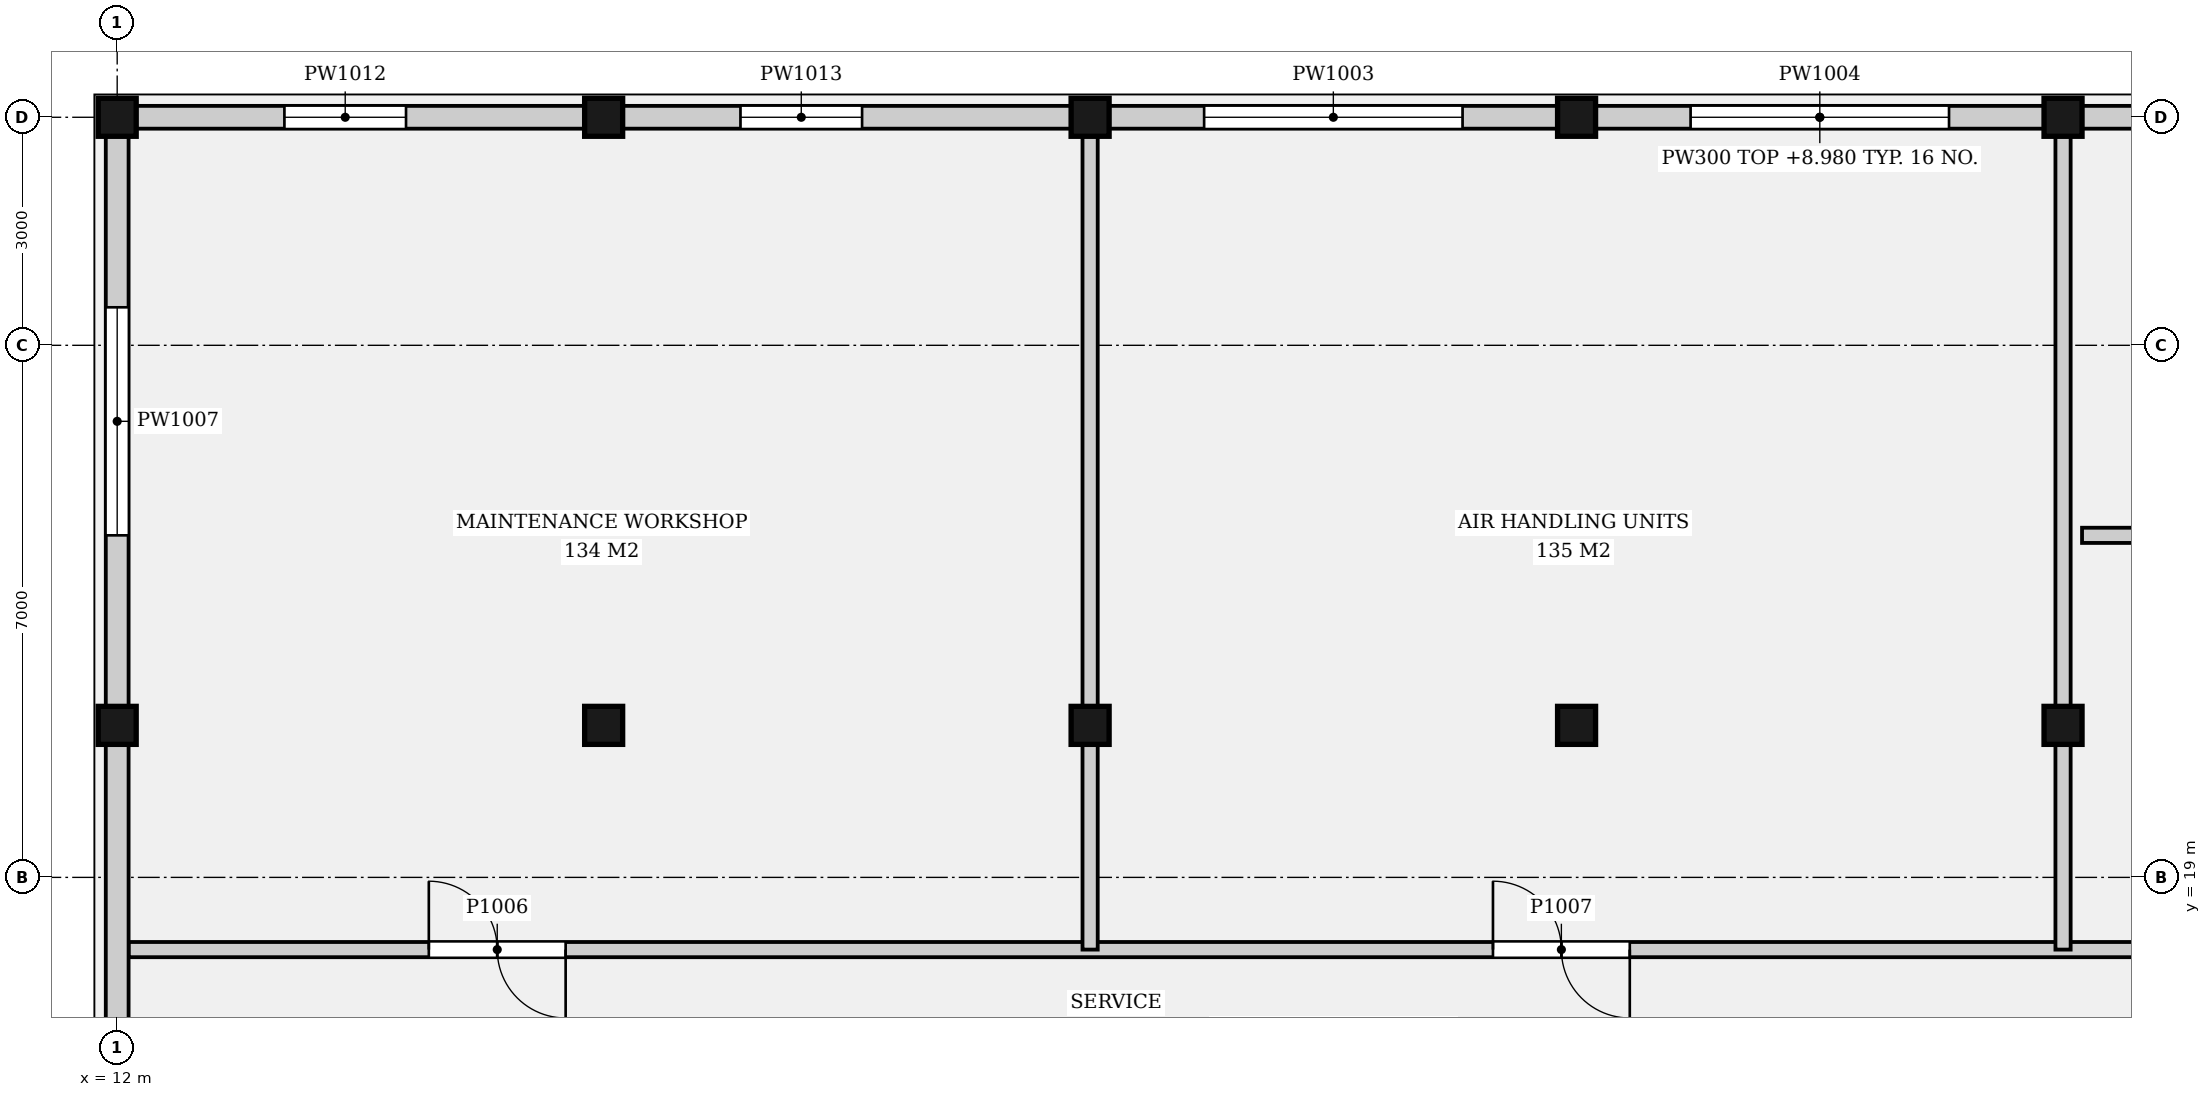
"""IFC4 building model, lengths in metres.
Left out: names, types, materials, properties, quantities, classifications, styles, units other than length and angle.
Written with IfcOpenShell. Run it as: python <this file> out.ifc"""

import sys

from ifc_helpers import new_model, si_unit, direction, frame, frame_2d, origin, origin_2d, place, context, subcontext, project, spatial, rectangle, extrude, element, fill, save


model = new_model("IFC4")
c1 = context("Model", 3, precision=1e-05, world=origin(), true_north=direction((0.0, 1.0)))
c2 = subcontext(c1, "Body", "Model", "MODEL_VIEW")
j1 = project(units=[si_unit("LENGTHUNIT", "METRE"), si_unit("PLANEANGLEUNIT", "RADIAN")], contexts=[c1])
p1 = place(None, origin())
s1 = spatial("IfcSite", under=j1, at=p1, CompositionType="ELEMENT")
p2 = place(p1, origin())
s2 = spatial("IfcBuilding", under=s1, at=p2, CompositionType="ELEMENT")
p3 = place(p2, frame((0.0, 0.0, 5.0)))
s3 = spatial("IfcBuildingStorey", under=s2, at=p3, CompositionType="ELEMENT", Elevation=5.0)
for number, where, z_axis, x_axis in (
    (1, (12.0, 21.0, 0.0), (0.0, 0.0, 1.0), (1.0, 0.0, 0.0)),
    (2, (12.0, 29.0, 0.0), (0.0, 0.0, 1.0), (1.0, 0.0, 0.0)),
    (3, (18.4, 21.0, 0.0), (0.0, 0.0, 1.0), (1.0, 0.0, 0.0)),
    (4, (18.4, 29.0, 0.0), (0.0, 0.0, 1.0), (1.0, 0.0, 0.0)),
    (5, (24.8, 21.0, 0.0), (0.0, 0.0, 1.0), (1.0, 0.0, 0.0)),
    (6, (24.8, 29.0, 0.0), (0.0, 0.0, 1.0), (1.0, 0.0, 0.0)),
    (7, (31.2, 21.0, 0.0), (0.0, 0.0, 1.0), (1.0, 0.0, 0.0)),
    (8, (31.2, 29.0, 0.0), (0.0, 0.0, 1.0), (1.0, 0.0, 0.0)),
    (9, (37.6, 21.0, 0.0), (0.0, 0.0, 1.0), (1.0, 0.0, 0.0)),
    (10, (37.6, 29.0, 0.0), (0.0, 0.0, 1.0), (1.0, 0.0, 0.0)),
):
    element("IfcColumn", number, at=place(p3, frame(where, z_axis=z_axis, x_axis=x_axis)), inside=s3, PredefinedType="COLUMN", context=c2, shape_type="SweptSolid", body=[
        extrude(rectangle(XDim=0.5, YDim=0.5, at=origin_2d()), origin(), (0.0, 0.0, 1.0), 4.4),
    ])
p4 = place(p3, frame((12.25, 29.0, 0.0), z_axis=(0.0, 0.0, 1.0), x_axis=(1.0, 0.0, 0.0)))
e11 = element("IfcWall", 11, at=p4, inside=s3, PredefinedType="SOLIDWALL", context=c2, shape_type="SweptSolid", body=[
    extrude(rectangle(XDim=5.9, YDim=0.3, at=frame_2d((2.95, 0.0))), origin(), (0.0, 0.0, 1.0), 3.98),
])
p5 = place(p4, frame((1.95, 0.0, 1.0)))
e12 = element("IfcOpeningElement", 12, at=p5, cuts=e11, PredefinedType="OPENING", context=c2, shape_type="SweptSolid", body=[
    extrude(rectangle(XDim=1.6, YDim=1.2, at=frame_2d((0.8, 0.6))), frame((0.0, 0.16, 0.0), z_axis=(0.0, -1.0, 0.0), x_axis=(1.0, 0.0, 0.0)), (0.0, 0.0, 1.0), 0.32),
])
p6 = place(p3, frame((18.65, 29.0, 0.0), z_axis=(0.0, 0.0, 1.0), x_axis=(1.0, 0.0, 0.0)))
e13 = element("IfcWall", 13, at=p6, inside=s3, PredefinedType="SOLIDWALL", context=c2, shape_type="SweptSolid", body=[
    extrude(rectangle(XDim=5.9, YDim=0.3, at=frame_2d((2.95, 0.0))), origin(), (0.0, 0.0, 1.0), 3.98),
])
p7 = place(p6, frame((1.55, 0.0, 1.0)))
e14 = element("IfcOpeningElement", 14, at=p7, cuts=e13, PredefinedType="OPENING", context=c2, shape_type="SweptSolid", body=[
    extrude(rectangle(XDim=1.6, YDim=1.2, at=frame_2d((0.8, 0.6))), frame((0.0, 0.16, 0.0), z_axis=(0.0, -1.0, 0.0), x_axis=(1.0, 0.0, 0.0)), (0.0, 0.0, 1.0), 0.32),
])
p8 = place(p3, frame((25.05, 29.0, 0.0), z_axis=(0.0, 0.0, 1.0), x_axis=(1.0, 0.0, 0.0)))
e15 = element("IfcWall", 15, at=p8, inside=s3, PredefinedType="SOLIDWALL", context=c2, shape_type="SweptSolid", body=[
    extrude(rectangle(XDim=5.9, YDim=0.3, at=frame_2d((2.95, 0.0))), origin(), (0.0, 0.0, 1.0), 3.98),
])
p9 = place(p8, frame((1.25, 0.0, 0.6)))
e16 = element("IfcOpeningElement", 16, at=p9, cuts=e15, PredefinedType="OPENING", context=c2, shape_type="SweptSolid", body=[
    extrude(rectangle(XDim=3.4, YDim=2.4, at=frame_2d((1.7, 1.2))), frame((0.0, 0.16, 0.0), z_axis=(0.0, -1.0, 0.0), x_axis=(1.0, 0.0, 0.0)), (0.0, 0.0, 1.0), 0.32),
])
p10 = place(p3, frame((31.45, 29.0, 0.0), z_axis=(0.0, 0.0, 1.0), x_axis=(1.0, 0.0, 0.0)))
e17 = element("IfcWall", 17, at=p10, inside=s3, PredefinedType="SOLIDWALL", context=c2, shape_type="SweptSolid", body=[
    extrude(rectangle(XDim=5.9, YDim=0.3, at=frame_2d((2.95, 0.0))), origin(), (0.0, 0.0, 1.0), 3.98),
])
p11 = place(p10, frame((1.25, 0.0, 0.6)))
e18 = element("IfcOpeningElement", 18, at=p11, cuts=e17, PredefinedType="OPENING", context=c2, shape_type="SweptSolid", body=[
    extrude(rectangle(XDim=3.4, YDim=2.4, at=frame_2d((1.7, 1.2))), frame((0.0, 0.16, 0.0), z_axis=(0.0, -1.0, 0.0), x_axis=(1.0, 0.0, 0.0)), (0.0, 0.0, 1.0), 0.32),
])
p12 = place(p3, frame((37.85, 29.0, 0.0), z_axis=(0.0, 0.0, 1.0), x_axis=(1.0, 0.0, 0.0)))
e19 = element("IfcWall", 19, at=p12, inside=s3, PredefinedType="SOLIDWALL", context=c2, shape_type="SweptSolid", body=[
    extrude(rectangle(XDim=5.9, YDim=0.3, at=frame_2d((2.95, 0.0))), origin(), (0.0, 0.0, 1.0), 3.98),
])
p13 = place(p12, frame((1.25, 0.0, 0.6)))
e20 = element("IfcOpeningElement", 20, at=p13, cuts=e19, PredefinedType="OPENING", context=c2, shape_type="SweptSolid", body=[
    extrude(rectangle(XDim=3.0, YDim=2.2, at=frame_2d((1.5, 1.1))), frame((0.0, 0.16, 0.0), z_axis=(0.0, -1.0, 0.0), x_axis=(1.0, 0.0, 0.0)), (0.0, 0.0, 1.0), 0.32),
])
p14 = place(p3, frame((12.0, 13.25, 0.0), z_axis=(0.0, 0.0, 1.0), x_axis=(0.0, 1.0, 0.0)))
e21 = element("IfcWall", 21, at=p14, inside=s3, PredefinedType="SOLIDWALL", context=c2, shape_type="SweptSolid", body=[
    extrude(rectangle(XDim=7.5, YDim=0.3, at=frame_2d((3.75, 0.0))), origin(), (0.0, 0.0, 1.0), 3.98),
])
p15 = place(p14, frame((0.55, 0.0, 1.2)))
e22 = element("IfcOpeningElement", 22, at=p15, cuts=e21, PredefinedType="OPENING", context=c2, shape_type="SweptSolid", body=[
    extrude(rectangle(XDim=1.4, YDim=1.2, at=frame_2d((0.7, 0.6))), frame((0.0, 0.16, 0.0), z_axis=(0.0, -1.0, 0.0), x_axis=(1.0, 0.0, 0.0)), (0.0, 0.0, 1.0), 0.32),
])
p16 = place(p3, frame((12.0, 21.25, 0.0), z_axis=(0.0, 0.0, 1.0), x_axis=(0.0, 1.0, 0.0)))
e23 = element("IfcWall", 23, at=p16, inside=s3, PredefinedType="SOLIDWALL", context=c2, shape_type="SweptSolid", body=[
    extrude(rectangle(XDim=7.5, YDim=0.3, at=frame_2d((3.75, 0.0))), origin(), (0.0, 0.0, 1.0), 3.98),
])
p17 = place(p16, frame((2.25, 0.0, 0.6)))
e24 = element("IfcOpeningElement", 24, at=p17, cuts=e23, PredefinedType="OPENING", context=c2, shape_type="SweptSolid", body=[
    extrude(rectangle(XDim=3.0, YDim=2.2, at=frame_2d((1.5, 1.1))), frame((0.0, 0.16, 0.0), z_axis=(0.0, -1.0, 0.0), x_axis=(1.0, 0.0, 0.0)), (0.0, 0.0, 1.0), 0.32),
])
p18 = place(p3, frame((12.15, 18.05, 0.0), z_axis=(0.0, 0.0, 1.0), x_axis=(1.0, 0.0, 0.0)))
e25 = element("IfcWall", 25, at=p18, inside=s3, PredefinedType="PARTITIONING", context=c2, shape_type="SweptSolid", body=[
    extrude(rectangle(XDim=31.7, YDim=0.2, at=frame_2d((15.85, 0.0))), origin(), (0.0, 0.0, 1.0), 3.98),
])
p19 = place(p18, frame((3.95, 0.0, 0.0)))
e26 = element("IfcOpeningElement", 26, at=p19, cuts=e25, PredefinedType="OPENING", context=c2, shape_type="SweptSolid", body=[
    extrude(rectangle(XDim=1.8, YDim=2.4, at=frame_2d((0.9, 1.2))), frame((0.0, 0.11, 0.0), z_axis=(0.0, -1.0, 0.0), x_axis=(1.0, 0.0, 0.0)), (0.0, 0.0, 1.0), 0.22),
])
p20 = place(p18, frame((17.95, 0.0, 0.0)))
e27 = element("IfcOpeningElement", 27, at=p20, cuts=e25, PredefinedType="OPENING", context=c2, shape_type="SweptSolid", body=[
    extrude(rectangle(XDim=1.8, YDim=2.4, at=frame_2d((0.9, 1.2))), frame((0.0, 0.11, 0.0), z_axis=(0.0, -1.0, 0.0), x_axis=(1.0, 0.0, 0.0)), (0.0, 0.0, 1.0), 0.22),
])
p21 = place(p18, frame((27.85, 0.0, 0.0)))
e28 = element("IfcOpeningElement", 28, at=p21, cuts=e25, PredefinedType="OPENING", context=c2, shape_type="SweptSolid", body=[
    extrude(rectangle(XDim=1.0, YDim=2.1, at=frame_2d((0.5, 1.05))), frame((0.0, 0.11, 0.0), z_axis=(0.0, -1.0, 0.0), x_axis=(1.0, 0.0, 0.0)), (0.0, 0.0, 1.0), 0.22),
])
p22 = place(p3, frame((37.85, 23.5, 0.0), z_axis=(0.0, 0.0, 1.0), x_axis=(1.0, 0.0, 0.0)))
e29 = element("IfcWall", 29, at=p22, inside=s3, PredefinedType="PARTITIONING", context=c2, shape_type="SweptSolid", body=[
    extrude(rectangle(XDim=6.0, YDim=0.2, at=frame_2d((3.0, 0.0))), origin(), (0.0, 0.0, 1.0), 3.98),
])
p23 = place(p22, frame((2.35, 0.0, 0.0)))
e30 = element("IfcOpeningElement", 30, at=p23, cuts=e29, PredefinedType="OPENING", context=c2, shape_type="SweptSolid", body=[
    extrude(rectangle(XDim=1.0, YDim=2.1, at=frame_2d((0.5, 1.05))), frame((0.0, 0.11, 0.0), z_axis=(0.0, -1.0, 0.0), x_axis=(1.0, 0.0, 0.0)), (0.0, 0.0, 1.0), 0.22),
])
p24 = place(p3, frame((24.8, 18.05, 0.0), z_axis=(0.0, 0.0, 1.0), x_axis=(0.0, 1.0, 0.0)))
e31 = element("IfcWall", 31, at=p24, inside=s3, PredefinedType="PARTITIONING", context=c2, shape_type="SweptSolid", body=[
    extrude(rectangle(XDim=2.7, YDim=0.2, at=frame_2d((1.35, 0.0))), origin(), (0.0, 0.0, 1.0), 3.98),
])
p25 = place(p3, frame((24.8, 21.25, 0.0), z_axis=(0.0, 0.0, 1.0), x_axis=(0.0, 1.0, 0.0)))
e32 = element("IfcWall", 32, at=p25, inside=s3, PredefinedType="PARTITIONING", context=c2, shape_type="SweptSolid", body=[
    extrude(rectangle(XDim=7.5, YDim=0.2, at=frame_2d((3.75, 0.0))), origin(), (0.0, 0.0, 1.0), 3.98),
])
p26 = place(p3, frame((37.6, 18.05, 0.0), z_axis=(0.0, 0.0, 1.0), x_axis=(0.0, 1.0, 0.0)))
e33 = element("IfcWall", 33, at=p26, inside=s3, PredefinedType="PARTITIONING", context=c2, shape_type="SweptSolid", body=[
    extrude(rectangle(XDim=2.7, YDim=0.2, at=frame_2d((1.35, 0.0))), origin(), (0.0, 0.0, 1.0), 3.98),
])
p27 = place(p3, frame((37.6, 21.25, 0.0), z_axis=(0.0, 0.0, 1.0), x_axis=(0.0, 1.0, 0.0)))
e34 = element("IfcWall", 34, at=p27, inside=s3, PredefinedType="PARTITIONING", context=c2, shape_type="SweptSolid", body=[
    extrude(rectangle(XDim=7.5, YDim=0.2, at=frame_2d((3.75, 0.0))), origin(), (0.0, 0.0, 1.0), 3.98),
])
p28 = place(p9, origin())
e35 = element("IfcWindow", 35, at=p28, inside=s3, PartitioningType="SINGLE_PANEL", PredefinedType="USERDEFINED", context=c2, shape_type="SweptSolid", body=[
    extrude(rectangle(XDim=3.4, YDim=2.4, at=frame_2d((1.7, 1.2))), frame((0.0, 0.03, 0.0), z_axis=(0.0, -1.0, 0.0), x_axis=(1.0, 0.0, 0.0)), (0.0, 0.0, 1.0), 0.06),
])
fill(e16, e35)
p29 = place(p11, origin())
e36 = element("IfcWindow", 36, at=p29, inside=s3, PartitioningType="SINGLE_PANEL", PredefinedType="USERDEFINED", context=c2, shape_type="SweptSolid", body=[
    extrude(rectangle(XDim=3.4, YDim=2.4, at=frame_2d((1.7, 1.2))), frame((0.0, 0.03, 0.0), z_axis=(0.0, -1.0, 0.0), x_axis=(1.0, 0.0, 0.0)), (0.0, 0.0, 1.0), 0.06),
])
fill(e18, e36)
p30 = place(p17, origin())
e37 = element("IfcWindow", 37, at=p30, inside=s3, PartitioningType="SINGLE_PANEL", PredefinedType="USERDEFINED", context=c2, shape_type="SweptSolid", body=[
    extrude(rectangle(XDim=3.0, YDim=2.2, at=frame_2d((1.5, 1.1))), frame((0.0, 0.03, 0.0), z_axis=(0.0, -1.0, 0.0), x_axis=(1.0, 0.0, 0.0)), (0.0, 0.0, 1.0), 0.06),
])
fill(e24, e37)
p31 = place(p5, origin())
e38 = element("IfcWindow", 38, at=p31, inside=s3, PartitioningType="SINGLE_PANEL", PredefinedType="WINDOW", context=c2, shape_type="SweptSolid", body=[
    extrude(rectangle(XDim=1.6, YDim=1.2, at=frame_2d((0.8, 0.6))), frame((0.0, 0.03, 0.0), z_axis=(0.0, -1.0, 0.0), x_axis=(1.0, 0.0, 0.0)), (0.0, 0.0, 1.0), 0.06),
])
fill(e12, e38)
p32 = place(p7, origin())
e39 = element("IfcWindow", 39, at=p32, inside=s3, PartitioningType="SINGLE_PANEL", PredefinedType="WINDOW", context=c2, shape_type="SweptSolid", body=[
    extrude(rectangle(XDim=1.6, YDim=1.2, at=frame_2d((0.8, 0.6))), frame((0.0, 0.03, 0.0), z_axis=(0.0, -1.0, 0.0), x_axis=(1.0, 0.0, 0.0)), (0.0, 0.0, 1.0), 0.06),
])
fill(e14, e39)
p33 = place(p19, origin())
e40 = element("IfcDoor", 40, at=p33, inside=s3, OperationType="DOUBLE_DOOR_SINGLE_SWING", PredefinedType="DOOR", context=c2, shape_type="SweptSolid", body=[
    extrude(rectangle(XDim=1.8, YDim=2.4, at=frame_2d((0.9, 1.2))), frame((0.0, 0.025, 0.0), z_axis=(0.0, -1.0, 0.0), x_axis=(1.0, 0.0, 0.0)), (0.0, 0.0, 1.0), 0.05),
])
fill(e26, e40)
p34 = place(p20, origin())
e41 = element("IfcDoor", 41, at=p34, inside=s3, OperationType="DOUBLE_DOOR_SINGLE_SWING", PredefinedType="DOOR", context=c2, shape_type="SweptSolid", body=[
    extrude(rectangle(XDim=1.8, YDim=2.4, at=frame_2d((0.9, 1.2))), frame((0.0, 0.025, 0.0), z_axis=(0.0, -1.0, 0.0), x_axis=(1.0, 0.0, 0.0)), (0.0, 0.0, 1.0), 0.05),
])
fill(e27, e41)
save(model, sys.argv[1])
